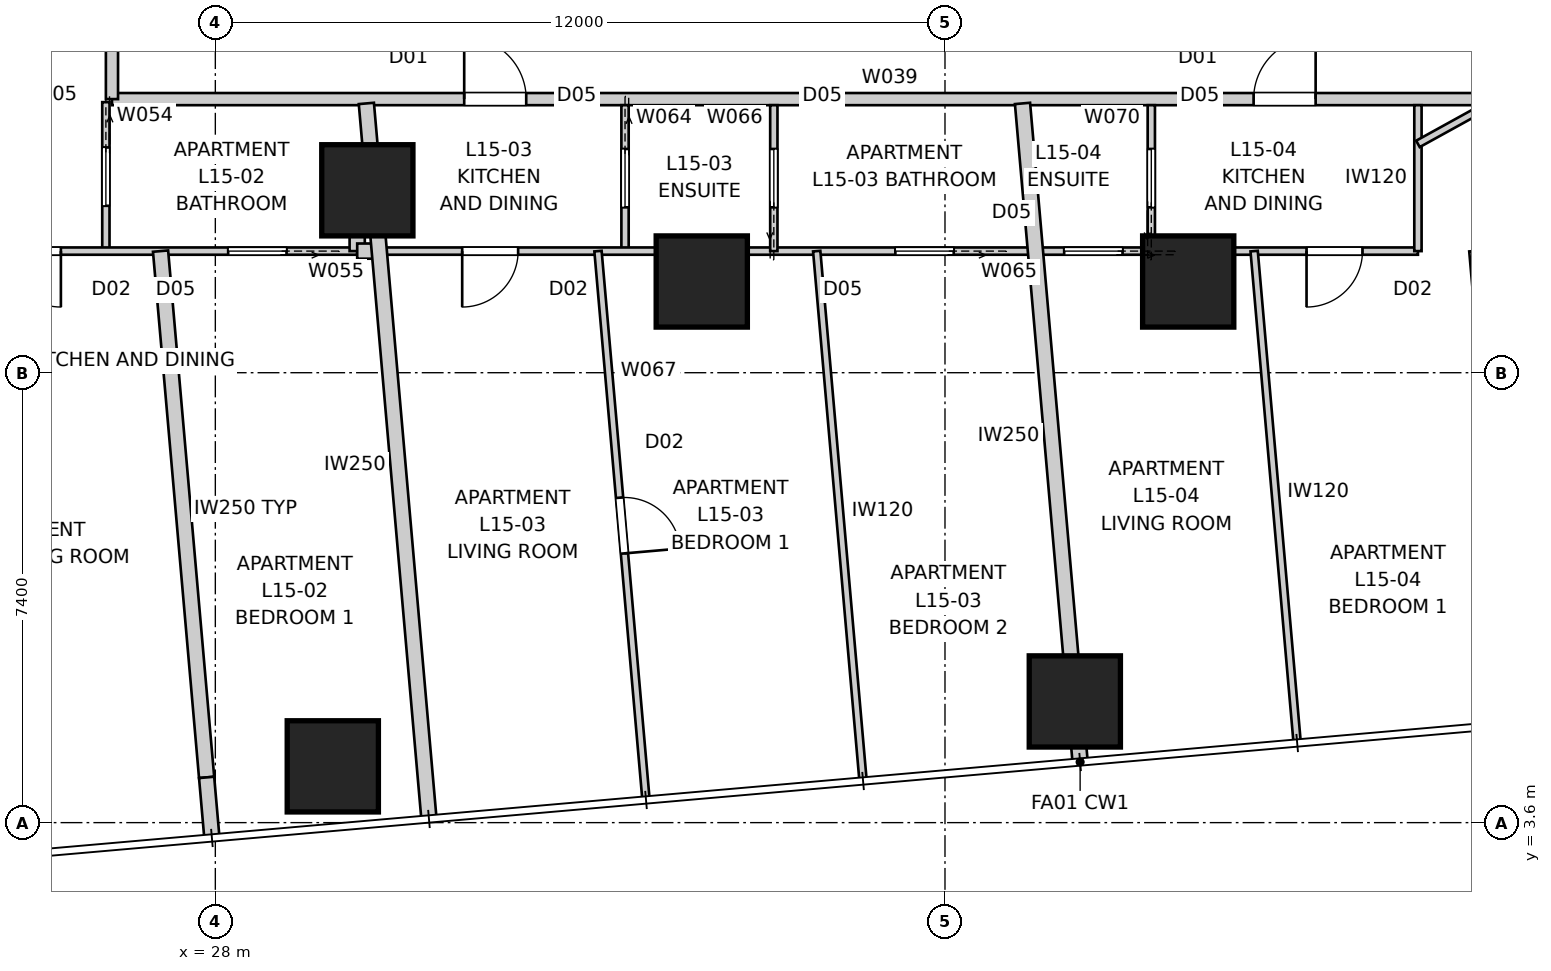
"""IFC4 building model, lengths in metres.
Left out: names, types, materials, properties, quantities, classifications, styles, units other than length and angle.
Written with IfcOpenShell. Run it as: python <this file> out.ifc"""

import sys

from ifc_helpers import new_model, si_unit, direction, frame, frame_2d, origin, origin_2d, place, context, subcontext, project, spatial, rectangle, extrude, element, fill, save


model = new_model("IFC4")
c1 = context("Model", 3, precision=1e-05, world=origin(), true_north=direction((0.0, 1.0)))
c2 = subcontext(c1, "Body", "Model", "MODEL_VIEW")
j1 = project(units=[si_unit("LENGTHUNIT", "METRE"), si_unit("PLANEANGLEUNIT", "RADIAN")], contexts=[c1])
p1 = place(None, origin())
s1 = spatial("IfcSite", under=j1, at=p1, CompositionType="ELEMENT")
p2 = place(p1, origin())
s2 = spatial("IfcBuilding", under=s1, at=p2, CompositionType="ELEMENT")
p3 = place(p2, frame((0.0, 0.0, 57.4)))
s3 = spatial("IfcBuildingStorey", under=s2, at=p3, CompositionType="ELEMENT", Elevation=57.4)
for number, where, z_axis, x_axis in (
    (1, (29.932, 4.526, 0.0), (0.0, 0.0, 1.0), (1.0, 0.0, 0.0)),
    (2, (42.135, 5.593, 0.0), (0.0, 0.0, 1.0), (1.0, 0.0, 0.0)),
    (3, (30.5, 14.0, 0.0), (0.0, 0.0, 1.0), (1.0, 0.0, 0.0)),
    (4, (36.0, 12.5, 0.0), (0.0, 0.0, 1.0), (1.0, 0.0, 0.0)),
    (5, (44.0, 12.5, 0.0), (0.0, 0.0, 1.0), (1.0, 0.0, 0.0)),
):
    element("IfcColumn", number, at=place(p3, frame(where, z_axis=z_axis, x_axis=x_axis)), inside=s3, PredefinedType="COLUMN", context=c2, shape_type="SweptSolid", body=[
        extrude(rectangle(XDim=1.5, YDim=1.5, at=origin_2d()), origin(), (0.0, 0.0, 1.0), 3.4),
    ])
p4 = place(p3, frame((26.3, 15.5, 0.0), z_axis=(0.0, 0.0, 1.0), x_axis=(1.0, 0.0, 0.0)))
e6 = element("IfcWall", 6, at=p4, inside=s3, PredefinedType="PARTITIONING", context=c2, shape_type="SweptSolid", body=[
    extrude(rectangle(XDim=27.4, YDim=0.2, at=frame_2d((13.7, 0.0))), origin(), (0.0, 0.0, 1.0), 3.25),
])
p5 = place(p4, frame((18.776, 0.0, 0.0)))
e7 = element("IfcOpeningElement", 7, at=p5, cuts=e6, PredefinedType="OPENING", context=c2, shape_type="SweptSolid", body=[
    extrude(rectangle(XDim=1.02, YDim=2.34, at=frame_2d((0.51, 1.17))), frame((0.0, 0.11, 0.0), z_axis=(0.0, -1.0, 0.0), x_axis=(1.0, 0.0, 0.0)), (0.0, 0.0, 1.0), 0.22),
])
p6 = place(p4, frame((5.793, 0.0, 0.0)))
e8 = element("IfcOpeningElement", 8, at=p6, cuts=e6, PredefinedType="OPENING", context=c2, shape_type="SweptSolid", body=[
    extrude(rectangle(XDim=1.02, YDim=2.34, at=frame_2d((0.51, 1.17))), frame((0.0, 0.11, 0.0), z_axis=(0.0, -1.0, 0.0), x_axis=(1.0, 0.0, 0.0)), (0.0, 0.0, 1.0), 0.22),
])
p7 = place(p3, frame((26.3, 44.5, 0.0), z_axis=(0.0, 0.0, 1.0), x_axis=(0.0, -1.0, 0.0)))
e9 = element("IfcWall", 9, at=p7, inside=s3, PredefinedType="PARTITIONING", context=c2, shape_type="SweptSolid", body=[
    extrude(rectangle(XDim=29.0, YDim=0.2, at=frame_2d((14.5, 0.0))), origin(), (0.0, 0.0, 1.0), 3.25),
])
p8 = place(p7, frame((6.85, 0.0, 0.0)))
e10 = element("IfcOpeningElement", 10, at=p8, cuts=e9, PredefinedType="OPENING", context=c2, shape_type="SweptSolid", body=[
    extrude(rectangle(XDim=1.02, YDim=2.34, at=frame_2d((0.51, 1.17))), frame((0.0, 0.11, 0.0), z_axis=(0.0, -1.0, 0.0), x_axis=(1.0, 0.0, 0.0)), (0.0, 0.0, 1.0), 0.22),
])
p9 = place(p7, frame((2.345, 0.0, 0.0)))
e11 = element("IfcOpeningElement", 11, at=p9, cuts=e9, PredefinedType="OPENING", context=c2, shape_type="SweptSolid", body=[
    extrude(rectangle(XDim=1.02, YDim=2.1, at=frame_2d((0.51, 1.05))), frame((0.0, 0.11, 0.0), z_axis=(0.0, -1.0, 0.0), x_axis=(1.0, 0.0, 0.0)), (0.0, 0.0, 1.0), 0.22),
])
p10 = place(p7, frame((17.166, 0.0, 0.0)))
e12 = element("IfcOpeningElement", 12, at=p10, cuts=e9, PredefinedType="OPENING", context=c2, shape_type="SweptSolid", body=[
    extrude(rectangle(XDim=1.02, YDim=2.34, at=frame_2d((0.51, 1.17))), frame((0.0, 0.11, 0.0), z_axis=(0.0, -1.0, 0.0), x_axis=(1.0, 0.0, 0.0)), (0.0, 0.0, 1.0), 0.22),
])
p11 = place(p7, frame((27.055, 0.0, 0.0)))
e13 = element("IfcOpeningElement", 13, at=p11, cuts=e9, PredefinedType="OPENING", context=c2, shape_type="SweptSolid", body=[
    extrude(rectangle(XDim=1.02, YDim=2.34, at=frame_2d((0.51, 1.17))), frame((0.0, 0.11, 0.0), z_axis=(0.0, -1.0, 0.0), x_axis=(1.0, 0.0, 0.0)), (0.0, 0.0, 1.0), 0.22),
])
p12 = place(p3, frame((42.222, 4.597, 0.0), z_axis=(0.0, 0.0, 1.0), x_axis=(-0.087140211333, 0.996196056792, 0.0)))
e14 = element("IfcWall", 14, at=p12, inside=s3, PredefinedType="PARTITIONING", context=c2, shape_type="SweptSolid", body=[
    extrude(rectangle(XDim=10.873, YDim=0.25, at=frame_2d((5.437, 0.0))), origin(), (0.0, 0.0, 1.0), 3.25),
])
p13 = place(p3, frame((31.513, 3.66, 0.0), z_axis=(0.0, 0.0, 1.0), x_axis=(-0.087168232078, 0.996193605338, 0.0)))
e15 = element("IfcWall", 15, at=p13, inside=s3, PredefinedType="PARTITIONING", context=c2, shape_type="SweptSolid", body=[
    extrude(rectangle(XDim=11.814, YDim=0.25, at=frame_2d((5.907, 0.0))), origin(), (0.0, 0.0, 1.0), 3.25),
])
p14 = place(p3, frame((26.2, 15.45, 0.0), z_axis=(0.0, 0.0, 1.0), x_axis=(0.0, -1.0, 0.0)))
e16 = element("IfcWall", 16, at=p14, inside=s3, PredefinedType="PARTITIONING", context=c2, shape_type="SweptSolid", body=[
    extrude(rectangle(XDim=2.45, YDim=0.12, at=frame_2d((1.225, 0.0))), origin(), (0.0, 0.0, 1.0), 3.25),
])
p15 = place(p14, frame((0.745, 0.0, 0.0)))
e17 = element("IfcOpeningElement", 17, at=p15, cuts=e16, PredefinedType="OPENING", context=c2, shape_type="SweptSolid", body=[
    extrude(rectangle(XDim=0.96, YDim=2.1, at=frame_2d((0.48, 1.05))), frame((0.0, 0.07, 0.0), z_axis=(0.0, -1.0, 0.0), x_axis=(1.0, 0.0, 0.0)), (0.0, 0.0, 1.0), 0.14),
])
p16 = place(p3, frame((30.333, 13.0, 0.0), z_axis=(0.0, 0.0, 1.0), x_axis=(-1.0, 0.0, 0.0)))
e18 = element("IfcWall", 18, at=p16, inside=s3, PredefinedType="PARTITIONING", context=c2, shape_type="SweptSolid", body=[
    extrude(rectangle(XDim=6.533, YDim=0.12, at=frame_2d((3.267, 0.0))), origin(), (0.0, 0.0, 1.0), 3.25),
])
p17 = place(p16, frame((4.873, 0.0, 0.0)))
e19 = element("IfcOpeningElement", 19, at=p17, cuts=e18, PredefinedType="OPENING", context=c2, shape_type="SweptSolid", body=[
    extrude(rectangle(XDim=0.92, YDim=2.34, at=frame_2d((0.46, 1.17))), frame((0.0, 0.07, 0.0), z_axis=(0.0, -1.0, 0.0), x_axis=(1.0, 0.0, 0.0)), (0.0, 0.0, 1.0), 0.14),
])
p18 = place(p16, frame((1.162, 0.0, 0.0)))
e20 = element("IfcOpeningElement", 20, at=p18, cuts=e18, PredefinedType="OPENING", context=c2, shape_type="SweptSolid", body=[
    extrude(rectangle(XDim=0.96, YDim=2.1, at=frame_2d((0.48, 1.05))), frame((0.0, 0.07, 0.0), z_axis=(0.0, -1.0, 0.0), x_axis=(1.0, 0.0, 0.0)), (0.0, 0.0, 1.0), 0.14),
])
p19 = place(p3, frame((30.333, 14.396, 0.0), z_axis=(0.0, 0.0, 1.0), x_axis=(0.0, -1.0, 0.0)))
e21 = element("IfcWall", 21, at=p19, inside=s3, PredefinedType="PARTITIONING", context=c2, shape_type="SweptSolid", body=[
    extrude(rectangle(XDim=1.396, YDim=0.25, at=frame_2d((0.698, 0.0))), origin(), (0.0, 0.0, 1.0), 3.25),
])
p20 = place(p3, frame((27.099, 13.0, 0.0), z_axis=(0.0, 0.0, 1.0), x_axis=(0.087158236544, -0.99619447991, 0.0)))
e22 = element("IfcWall", 22, at=p20, inside=s3, PredefinedType="PARTITIONING", context=c2, shape_type="SweptSolid", body=[
    extrude(rectangle(XDim=8.689, YDim=0.25, at=frame_2d((4.344, 0.0))), origin(), (0.0, 0.0, 1.0), 2.638),
])
p21 = place(p3, frame((27.856, 4.344, 0.0), z_axis=(0.0, 0.0, 1.0), x_axis=(0.087233202944, -0.996187918168, 0.0)))
e23 = element("IfcWall", 23, at=p21, inside=s3, PredefinedType="PARTITIONING", context=c2, shape_type="SweptSolid", body=[
    extrude(rectangle(XDim=0.96, YDim=0.25, at=frame_2d((0.48, 0.0))), origin(), (0.0, 0.0, 1.0), 3.25),
])
p22 = place(p3, frame((30.333, 13.0, 0.0), z_axis=(0.0, 0.0, 1.0), x_axis=(1.0, 0.0, 0.0)))
e24 = element("IfcWall", 24, at=p22, inside=s3, PredefinedType="PARTITIONING", context=c2, shape_type="SweptSolid", body=[
    extrude(rectangle(XDim=0.363, YDim=0.25, at=frame_2d((0.182, 0.0))), origin(), (0.0, 0.0, 1.0), 3.25),
])
p23 = place(p3, frame((34.738, 15.4, 0.0), z_axis=(0.0, 0.0, 1.0), x_axis=(0.0, -1.0, 0.0)))
e25 = element("IfcWall", 25, at=p23, inside=s3, PredefinedType="PARTITIONING", context=c2, shape_type="SweptSolid", body=[
    extrude(rectangle(XDim=2.4, YDim=0.12, at=frame_2d((1.2, 0.0))), origin(), (0.0, 0.0, 1.0), 3.25),
])
p24 = place(p23, frame((0.72, 0.0, 0.0)))
e26 = element("IfcOpeningElement", 26, at=p24, cuts=e25, PredefinedType="OPENING", context=c2, shape_type="SweptSolid", body=[
    extrude(rectangle(XDim=0.96, YDim=2.1, at=frame_2d((0.48, 1.05))), frame((0.0, 0.07, 0.0), z_axis=(0.0, -1.0, 0.0), x_axis=(1.0, 0.0, 0.0)), (0.0, 0.0, 1.0), 0.14),
])
p25 = place(p3, frame((47.778, 13.0, 0.0), z_axis=(0.0, 0.0, 1.0), x_axis=(-1.0, 0.0, 0.0)))
e27 = element("IfcWall", 27, at=p25, inside=s3, PredefinedType="PARTITIONING", context=c2, shape_type="SweptSolid", body=[
    extrude(rectangle(XDim=17.082, YDim=0.12, at=frame_2d((8.541, 0.0))), origin(), (0.0, 0.0, 1.0), 2.549),
])
p26 = place(p25, frame((0.912, 0.0, 0.0)))
e28 = element("IfcOpeningElement", 28, at=p26, cuts=e27, PredefinedType="OPENING", context=c2, shape_type="SweptSolid", body=[
    extrude(rectangle(XDim=0.92, YDim=2.34, at=frame_2d((0.46, 1.17))), frame((0.0, 0.07, 0.0), z_axis=(0.0, -1.0, 0.0), x_axis=(1.0, 0.0, 0.0)), (0.0, 0.0, 1.0), 0.14),
])
p27 = place(p25, frame((14.798, 0.0, 0.0)))
e29 = element("IfcOpeningElement", 29, at=p27, cuts=e27, PredefinedType="OPENING", context=c2, shape_type="SweptSolid", body=[
    extrude(rectangle(XDim=0.92, YDim=2.34, at=frame_2d((0.46, 1.17))), frame((0.0, 0.07, 0.0), z_axis=(0.0, -1.0, 0.0), x_axis=(1.0, 0.0, 0.0)), (0.0, 0.0, 1.0), 0.14),
])
p28 = place(p25, frame((4.858, 0.0, 0.0)))
e30 = element("IfcOpeningElement", 30, at=p28, cuts=e27, PredefinedType="OPENING", context=c2, shape_type="SweptSolid", body=[
    extrude(rectangle(XDim=0.96, YDim=2.1, at=frame_2d((0.48, 1.05))), frame((0.0, 0.07, 0.0), z_axis=(0.0, -1.0, 0.0), x_axis=(1.0, 0.0, 0.0)), (0.0, 0.0, 1.0), 0.14),
])
p29 = place(p25, frame((7.635, 0.0, 0.0)))
e31 = element("IfcOpeningElement", 31, at=p29, cuts=e27, PredefinedType="OPENING", context=c2, shape_type="SweptSolid", body=[
    extrude(rectangle(XDim=0.96, YDim=2.1, at=frame_2d((0.48, 1.05))), frame((0.0, 0.07, 0.0), z_axis=(0.0, -1.0, 0.0), x_axis=(1.0, 0.0, 0.0)), (0.0, 0.0, 1.0), 0.14),
])
p30 = place(p3, frame((37.185, 13.0, 0.0), z_axis=(0.0, 0.0, 1.0), x_axis=(0.0, 1.0, 0.0)))
e32 = element("IfcWall", 32, at=p30, inside=s3, PredefinedType="PARTITIONING", context=c2, shape_type="SweptSolid", body=[
    extrude(rectangle(XDim=2.4, YDim=0.12, at=frame_2d((1.2, 0.0))), origin(), (0.0, 0.0, 1.0), 2.796),
])
p31 = place(p30, frame((0.72, 0.0, 0.0)))
e33 = element("IfcOpeningElement", 33, at=p31, cuts=e32, PredefinedType="OPENING", context=c2, shape_type="SweptSolid", body=[
    extrude(rectangle(XDim=0.96, YDim=2.1, at=frame_2d((0.48, 1.05))), frame((0.0, 0.07, 0.0), z_axis=(0.0, -1.0, 0.0), x_axis=(1.0, 0.0, 0.0)), (0.0, 0.0, 1.0), 0.14),
])
p32 = place(p3, frame((34.293, 13.0, 0.0), z_axis=(0.0, 0.0, 1.0), x_axis=(0.087160907995, -0.996194246178, 0.0)))
e34 = element("IfcWall", 34, at=p32, inside=s3, PredefinedType="PARTITIONING", context=c2, shape_type="SweptSolid", body=[
    extrude(rectangle(XDim=9.022, YDim=0.12, at=frame_2d((4.511, 0.0))), origin(), (0.0, 0.0, 1.0), 3.25),
])
p33 = place(p32, frame((4.071, 0.0, 0.0)))
e35 = element("IfcOpeningElement", 35, at=p33, cuts=e34, PredefinedType="OPENING", context=c2, shape_type="SweptSolid", body=[
    extrude(rectangle(XDim=0.92, YDim=2.34, at=frame_2d((0.46, 1.17))), frame((0.0, 0.07, 0.0), z_axis=(0.0, -1.0, 0.0), x_axis=(1.0, 0.0, 0.0)), (0.0, 0.0, 1.0), 0.14),
])
p34 = place(p3, frame((37.89, 13.0, 0.0), z_axis=(0.0, 0.0, 1.0), x_axis=(0.087158256162, -0.996194478193, 0.0)))
e36 = element("IfcWall", 36, at=p34, inside=s3, PredefinedType="PARTITIONING", context=c2, shape_type="SweptSolid", body=[
    extrude(rectangle(XDim=8.709, YDim=0.12, at=frame_2d((4.354, 0.0))), origin(), (0.0, 0.0, 1.0), 3.25),
])
p35 = place(p3, frame((47.778, 15.4, 0.0), z_axis=(0.0, 0.0, 1.0), x_axis=(0.0, -1.0, 0.0)))
e37 = element("IfcWall", 37, at=p35, inside=s3, PredefinedType="PARTITIONING", context=c2, shape_type="SweptSolid", body=[
    extrude(rectangle(XDim=2.4, YDim=0.12, at=frame_2d((1.2, 0.0))), origin(), (0.0, 0.0, 1.0), 3.25),
])
p36 = place(p3, frame((43.393, 13.0, 0.0), z_axis=(0.0, 0.0, 1.0), x_axis=(0.0, 1.0, 0.0)))
e38 = element("IfcWall", 38, at=p36, inside=s3, PredefinedType="PARTITIONING", context=c2, shape_type="SweptSolid", body=[
    extrude(rectangle(XDim=2.4, YDim=0.12, at=frame_2d((1.2, 0.0))), origin(), (0.0, 0.0, 1.0), 3.25),
])
p37 = place(p36, frame((0.72, 0.0, 0.0)))
e39 = element("IfcOpeningElement", 39, at=p37, cuts=e38, PredefinedType="OPENING", context=c2, shape_type="SweptSolid", body=[
    extrude(rectangle(XDim=0.96, YDim=2.1, at=frame_2d((0.48, 1.05))), frame((0.0, 0.07, 0.0), z_axis=(0.0, -1.0, 0.0), x_axis=(1.0, 0.0, 0.0)), (0.0, 0.0, 1.0), 0.14),
])
p38 = place(p3, frame((48.775, 15.313, 0.0), z_axis=(0.0, 0.0, 1.0), x_axis=(-0.875508887439, -0.483202015741, 0.0)))
e40 = element("IfcWall", 40, at=p38, inside=s3, PredefinedType="PARTITIONING", context=c2, shape_type="SweptSolid", body=[
    extrude(rectangle(XDim=1.139, YDim=0.12, at=frame_2d((0.569, 0.0))), origin(), (0.0, 0.0, 1.0), 3.25),
])
p39 = place(p3, frame((45.084, 13.0, 0.0), z_axis=(0.0, 0.0, 1.0), x_axis=(0.087184938313, -0.99619214338, 0.0)))
e41 = element("IfcWall", 41, at=p39, inside=s3, PredefinedType="PARTITIONING", context=c2, shape_type="SweptSolid", body=[
    extrude(rectangle(XDim=8.082, YDim=0.12, at=frame_2d((4.041, 0.0))), origin(), (0.0, 0.0, 1.0), 3.25),
])
p40 = place(p3, frame((48.681, 13.0, 0.0), z_axis=(0.0, 0.0, 1.0), x_axis=(0.0871517452, -0.996195047824, 0.0)))
e42 = element("IfcWall", 42, at=p40, inside=s3, PredefinedType="PARTITIONING", context=c2, shape_type="SweptSolid", body=[
    extrude(rectangle(XDim=7.768, YDim=0.12, at=frame_2d((3.884, 0.0))), origin(), (0.0, 0.0, 1.0), 3.25),
])
p41 = place(p40, frame((3.444, 0.0, 0.0)))
e43 = element("IfcOpeningElement", 43, at=p41, cuts=e42, PredefinedType="OPENING", context=c2, shape_type="SweptSolid", body=[
    extrude(rectangle(XDim=0.92, YDim=2.34, at=frame_2d((0.46, 1.17))), frame((0.0, 0.07, 0.0), z_axis=(0.0, -1.0, 0.0), x_axis=(1.0, 0.0, 0.0)), (0.0, 0.0, 1.0), 0.14),
])
p42 = place(p5, origin())
e44 = element("IfcDoor", 44, at=p42, inside=s3, OperationType="SINGLE_SWING_RIGHT", PredefinedType="DOOR", context=c2, shape_type="SweptSolid", body=[
    extrude(rectangle(XDim=1.02, YDim=2.34, at=frame_2d((0.51, 1.17))), frame((0.0, 0.025, 0.0), z_axis=(0.0, -1.0, 0.0), x_axis=(1.0, 0.0, 0.0)), (0.0, 0.0, 1.0), 0.05),
])
fill(e7, e44)
p43 = place(p6, origin())
e45 = element("IfcDoor", 45, at=p43, inside=s3, OperationType="SINGLE_SWING_LEFT", PredefinedType="DOOR", context=c2, shape_type="SweptSolid", body=[
    extrude(rectangle(XDim=1.02, YDim=2.34, at=frame_2d((0.51, 1.17))), frame((0.0, 0.025, 0.0), z_axis=(0.0, -1.0, 0.0), x_axis=(1.0, 0.0, 0.0)), (0.0, 0.0, 1.0), 0.05),
])
fill(e8, e45)
p44 = place(p26, origin())
e46 = element("IfcDoor", 46, at=p44, inside=s3, OperationType="SINGLE_SWING_RIGHT", PredefinedType="DOOR", context=c2, shape_type="SweptSolid", body=[
    extrude(rectangle(XDim=0.92, YDim=2.34, at=frame_2d((0.46, 1.17))), frame((0.0, 0.025, 0.0), z_axis=(0.0, -1.0, 0.0), x_axis=(1.0, 0.0, 0.0)), (0.0, 0.0, 1.0), 0.05),
])
fill(e28, e46)
p45 = place(p37, origin())
e47 = element("IfcDoor", 47, at=p45, inside=s3, OperationType="SLIDING_TO_LEFT", PredefinedType="DOOR", context=c2, shape_type="SweptSolid", body=[
    extrude(rectangle(XDim=0.96, YDim=2.1, at=frame_2d((0.48, 1.05))), frame((0.0, 0.025, 0.0), z_axis=(0.0, -1.0, 0.0), x_axis=(1.0, 0.0, 0.0)), (0.0, 0.0, 1.0), 0.05),
])
fill(e39, e47)
p46 = place(p27, origin())
e48 = element("IfcDoor", 48, at=p46, inside=s3, OperationType="SINGLE_SWING_RIGHT", PredefinedType="DOOR", context=c2, shape_type="SweptSolid", body=[
    extrude(rectangle(XDim=0.92, YDim=2.34, at=frame_2d((0.46, 1.17))), frame((0.0, 0.025, 0.0), z_axis=(0.0, -1.0, 0.0), x_axis=(1.0, 0.0, 0.0)), (0.0, 0.0, 1.0), 0.05),
])
fill(e29, e48)
p47 = place(p24, origin())
e49 = element("IfcDoor", 49, at=p47, inside=s3, OperationType="SLIDING_TO_LEFT", PredefinedType="DOOR", context=c2, shape_type="SweptSolid", body=[
    extrude(rectangle(XDim=0.96, YDim=2.1, at=frame_2d((0.48, 1.05))), frame((0.0, 0.025, 0.0), z_axis=(0.0, -1.0, 0.0), x_axis=(1.0, 0.0, 0.0)), (0.0, 0.0, 1.0), 0.05),
])
fill(e26, e49)
p48 = place(p15, origin())
e50 = element("IfcDoor", 50, at=p48, inside=s3, OperationType="SLIDING_TO_LEFT", PredefinedType="DOOR", context=c2, shape_type="SweptSolid", body=[
    extrude(rectangle(XDim=0.96, YDim=2.1, at=frame_2d((0.48, 1.05))), frame((0.0, 0.025, 0.0), z_axis=(0.0, -1.0, 0.0), x_axis=(1.0, 0.0, 0.0)), (0.0, 0.0, 1.0), 0.05),
])
fill(e17, e50)
p49 = place(p17, origin())
e51 = element("IfcDoor", 51, at=p49, inside=s3, OperationType="SINGLE_SWING_LEFT", PredefinedType="DOOR", context=c2, shape_type="SweptSolid", body=[
    extrude(rectangle(XDim=0.92, YDim=2.34, at=frame_2d((0.46, 1.17))), frame((0.0, 0.025, 0.0), z_axis=(0.0, -1.0, 0.0), x_axis=(1.0, 0.0, 0.0)), (0.0, 0.0, 1.0), 0.05),
])
fill(e19, e51)
p50 = place(p28, origin())
e52 = element("IfcDoor", 52, at=p50, inside=s3, OperationType="SLIDING_TO_LEFT", PredefinedType="DOOR", context=c2, shape_type="SweptSolid", body=[
    extrude(rectangle(XDim=0.96, YDim=2.1, at=frame_2d((0.48, 1.05))), frame((0.0, 0.025, 0.0), z_axis=(0.0, -1.0, 0.0), x_axis=(1.0, 0.0, 0.0)), (0.0, 0.0, 1.0), 0.05),
])
fill(e30, e52)
p51 = place(p33, origin())
e53 = element("IfcDoor", 53, at=p51, inside=s3, OperationType="SINGLE_SWING_RIGHT", PredefinedType="DOOR", context=c2, shape_type="SweptSolid", body=[
    extrude(rectangle(XDim=0.92, YDim=2.34, at=frame_2d((0.46, 1.17))), frame((0.0, 0.025, 0.0), z_axis=(0.0, -1.0, 0.0), x_axis=(1.0, 0.0, 0.0)), (0.0, 0.0, 1.0), 0.05),
])
fill(e35, e53)
p52 = place(p31, origin())
e54 = element("IfcDoor", 54, at=p52, inside=s3, OperationType="SLIDING_TO_LEFT", PredefinedType="DOOR", context=c2, shape_type="SweptSolid", body=[
    extrude(rectangle(XDim=0.96, YDim=2.1, at=frame_2d((0.48, 1.05))), frame((0.0, 0.025, 0.0), z_axis=(0.0, -1.0, 0.0), x_axis=(1.0, 0.0, 0.0)), (0.0, 0.0, 1.0), 0.05),
])
fill(e33, e54)
p53 = place(p18, origin())
e55 = element("IfcDoor", 55, at=p53, inside=s3, OperationType="SLIDING_TO_LEFT", PredefinedType="DOOR", context=c2, shape_type="SweptSolid", body=[
    extrude(rectangle(XDim=0.96, YDim=2.1, at=frame_2d((0.48, 1.05))), frame((0.0, 0.025, 0.0), z_axis=(0.0, -1.0, 0.0), x_axis=(1.0, 0.0, 0.0)), (0.0, 0.0, 1.0), 0.05),
])
fill(e20, e55)
p54 = place(p29, origin())
e56 = element("IfcDoor", 56, at=p54, inside=s3, OperationType="SLIDING_TO_LEFT", PredefinedType="DOOR", context=c2, shape_type="SweptSolid", body=[
    extrude(rectangle(XDim=0.96, YDim=2.1, at=frame_2d((0.48, 1.05))), frame((0.0, 0.025, 0.0), z_axis=(0.0, -1.0, 0.0), x_axis=(1.0, 0.0, 0.0)), (0.0, 0.0, 1.0), 0.05),
])
fill(e31, e56)
save(model, sys.argv[1])
